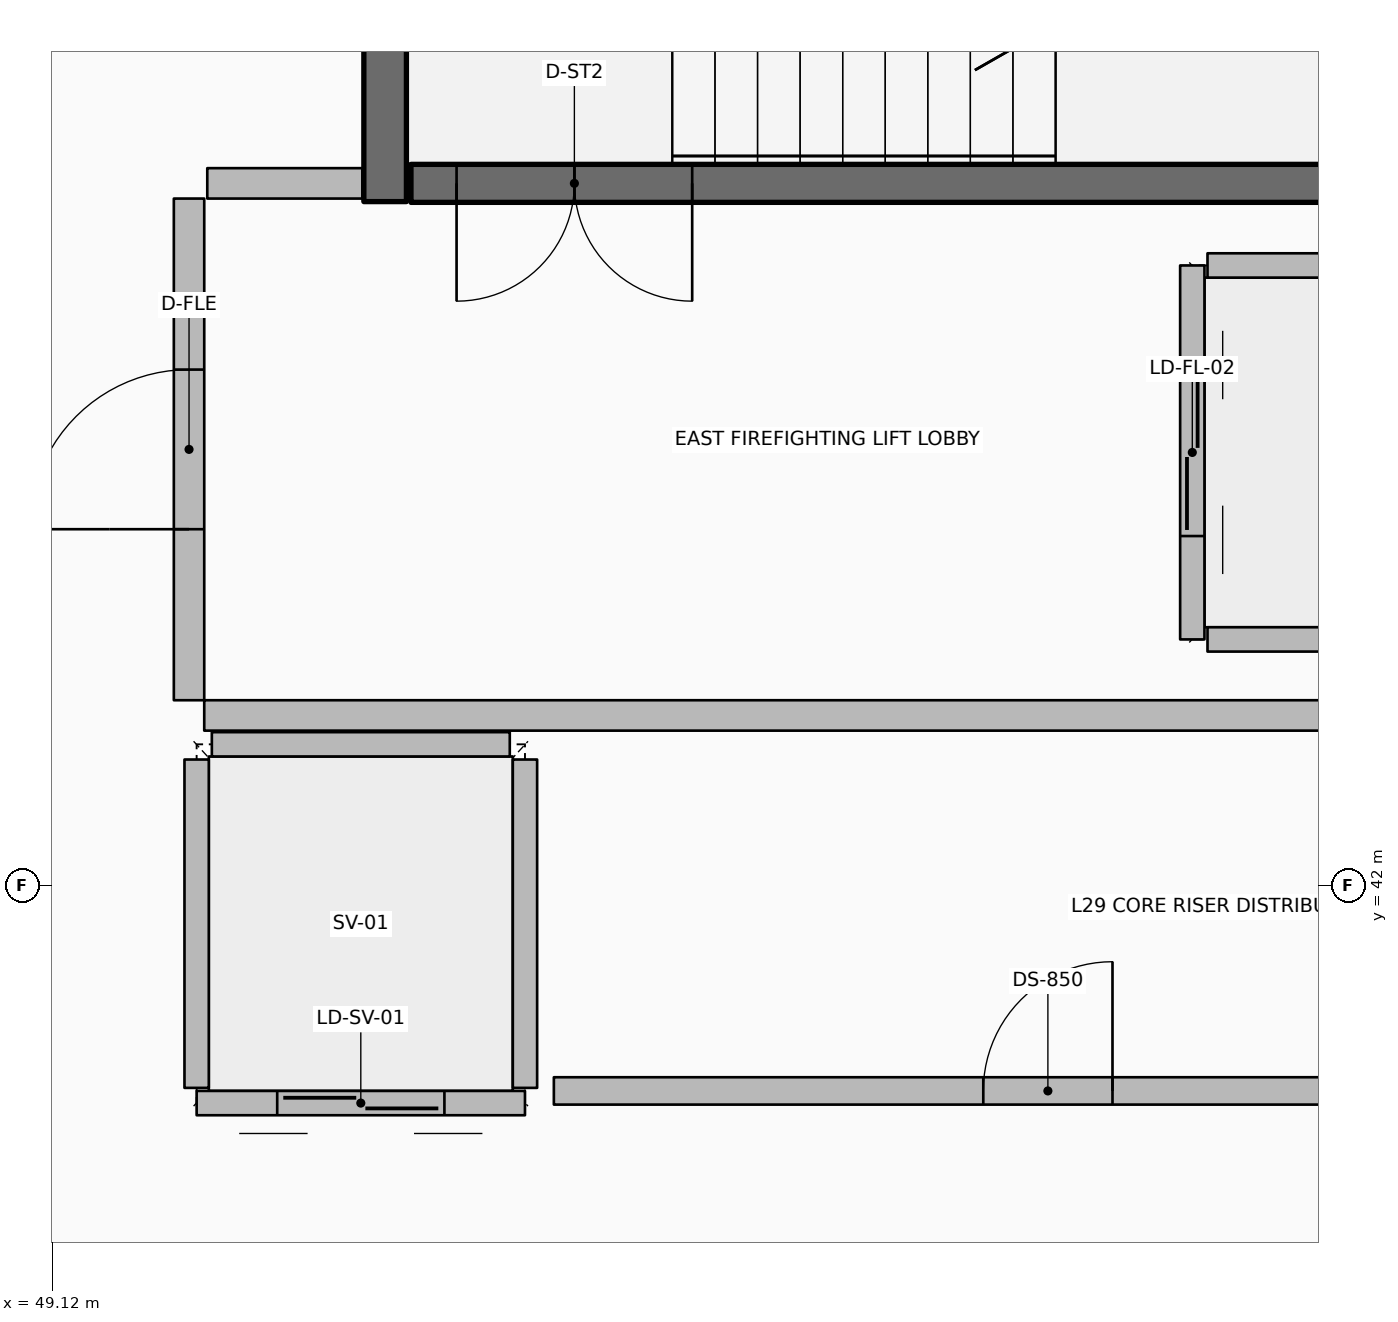
"""IFC4 building model, lengths in metres.
Left out: names, types, materials, properties, quantities, classifications, styles, units other than length and angle.
Written with IfcOpenShell. Run it as: python <this file> out.ifc"""

import sys

from ifc_helpers import new_model, si_unit, direction, frame, frame_2d, origin, origin_2d, place, context, subcontext, project, spatial, rectangle, hollow_rectangle, extrude, element, fill, save


model = new_model("IFC4")
c1 = context("Model", 3, precision=1e-05, world=origin(), true_north=direction((0.0, 1.0)))
c2 = subcontext(c1, "Body", "Model", "MODEL_VIEW")
j1 = project(units=[si_unit("LENGTHUNIT", "METRE"), si_unit("PLANEANGLEUNIT", "RADIAN")], contexts=[c1])
p1 = place(None, origin())
s1 = spatial("IfcSite", under=j1, at=p1, CompositionType="ELEMENT")
p2 = place(p1, origin())
s2 = spatial("IfcBuilding", under=s1, at=p2, CompositionType="ELEMENT")
p3 = place(p2, frame((0.0, 0.0, 116.4)))
s3 = spatial("IfcBuildingStorey", under=s2, at=p3, CompositionType="ELEMENT", Elevation=116.4)
p4 = place(p3, frame((51.31, 46.5, 0.0), z_axis=(0.0, 0.0, 1.0), x_axis=(0.0, 1.0, 0.0)))
e1 = element("IfcWall", 1, at=p4, inside=s3, PredefinedType="SHEAR", context=c2, shape_type="SweptSolid", body=[
    extrude(rectangle(XDim=3.5, YDim=0.28, at=frame_2d((1.75, 0.0))), origin(), (0.0, 0.0, 1.0), 6.6),
])
p5 = place(p3, frame((55.72, 46.62, 0.0), z_axis=(0.0, 0.0, 1.0), x_axis=(1.0, 0.0, 0.0)))
e2 = element("IfcColumn", 2, at=p5, inside=s3, PredefinedType="COLUMN", context=c2, shape_type="SweptSolid", body=[
    extrude(hollow_rectangle(XDim=0.2, YDim=0.2, WallThickness=0.01, InnerFilletRadius=0.01, OuterFilletRadius=0.02, at=origin_2d()), origin(), (0.0, 0.0, 1.0), 1.445),
])
p6 = place(p3, frame((56.42, 46.62, 0.0), z_axis=(0.0, 0.0, 1.0), x_axis=(1.0, 0.0, 0.0)))
e3 = element("IfcColumn", 3, at=p6, inside=s3, PredefinedType="COLUMN", context=c2, shape_type="SweptSolid", body=[
    extrude(hollow_rectangle(XDim=0.2, YDim=0.2, WallThickness=0.01, InnerFilletRadius=0.01, OuterFilletRadius=0.02, at=origin_2d()), origin(), (0.0, 0.0, 1.0), 4.745),
])
p7 = place(p3, frame((51.48, 46.62, 0.0), z_axis=(0.0, 0.0, 1.0), x_axis=(1.0, 0.0, 0.0)))
e4 = element("IfcWall", 4, at=p7, inside=s3, PredefinedType="SOLIDWALL", context=c2, shape_type="SweptSolid", body=[
    extrude(rectangle(XDim=7.54, YDim=0.25, at=frame_2d((3.77, 0.0))), origin(), (0.0, 0.0, 1.0), 6.28),
])
p8 = place(p7, frame((0.3, 0.0, 0.0)))
e5 = element("IfcOpeningElement", 5, at=p8, cuts=e4, PredefinedType="OPENING", context=c2, shape_type="SweptSolid", body=[
    extrude(rectangle(XDim=1.55, YDim=2.15, at=frame_2d((0.775, 1.075))), frame((0.0, 0.135, 0.0), z_axis=(0.0, -1.0, 0.0), x_axis=(1.0, 0.0, 0.0)), (0.0, 0.0, 1.0), 0.27),
])
p9 = place(p3, frame((56.62, 46.08, 0.0), z_axis=(0.0, 0.0, 1.0), x_axis=(0.0, -1.0, 0.0)))
e6 = element("IfcWall", 6, at=p9, inside=s3, PredefinedType="PARTITIONING", context=c2, shape_type="SweptSolid", body=[
    extrude(rectangle(XDim=2.46, YDim=0.16, at=frame_2d((1.23, 0.0))), origin(), (0.0, 0.0, 1.0), 6.28),
])
p10 = place(p9, frame((0.68, 0.0, 0.0)))
e7 = element("IfcOpeningElement", 7, at=p10, cuts=e6, PredefinedType="OPENING", context=c2, shape_type="SweptSolid", body=[
    extrude(rectangle(XDim=1.1, YDim=2.1, at=frame_2d((0.55, 1.05))), frame((0.0, 0.09, 0.0), z_axis=(0.0, -1.0, 0.0), x_axis=(1.0, 0.0, 0.0)), (0.0, 0.0, 1.0), 0.18),
])
for number, where, z_axis, x_axis in (
    (8, (56.72, 46.08, 0.0), (0.0, 0.0, 1.0), (1.0, 0.0, 0.0)),
    (9, (56.72, 43.62, 0.0), (0.0, 0.0, 1.0), (1.0, 0.0, 0.0)),
):
    element("IfcWall", number, at=place(p3, frame(where, z_axis=z_axis, x_axis=x_axis)), inside=s3, PredefinedType="PARTITIONING", context=c2, shape_type="SweptSolid", body=[
        extrude(rectangle(XDim=2.06, YDim=0.16, at=frame_2d((1.03, 0.0))), origin(), (0.0, 0.0, 1.0), 6.28),
    ])
p11 = place(p3, frame((52.23, 40.57, 0.0), z_axis=(0.0, 0.0, 1.0), x_axis=(-1.0, 0.0, 0.0)))
e10 = element("IfcWall", 10, at=p11, inside=s3, PredefinedType="PARTITIONING", context=c2, shape_type="SweptSolid", body=[
    extrude(rectangle(XDim=2.16, YDim=0.16, at=frame_2d((1.08, 0.0))), origin(), (0.0, 0.0, 1.0), 6.28),
])
p12 = place(p11, frame((0.53, 0.0, 0.0)))
e11 = element("IfcOpeningElement", 11, at=p12, cuts=e10, PredefinedType="OPENING", context=c2, shape_type="SweptSolid", body=[
    extrude(rectangle(XDim=1.1, YDim=2.1, at=frame_2d((0.55, 1.05))), frame((0.0, 0.09, 0.0), z_axis=(0.0, -1.0, 0.0), x_axis=(1.0, 0.0, 0.0)), (0.0, 0.0, 1.0), 0.18),
])
for number, where, z_axis, x_axis in (
    (12, (52.23, 40.67, 0.0), (0.0, 0.0, 1.0), (0.0, 1.0, 0.0)),
    (13, (50.07, 40.67, 0.0), (0.0, 0.0, 1.0), (0.0, 1.0, 0.0)),
):
    element("IfcWall", number, at=place(p3, frame(where, z_axis=z_axis, x_axis=x_axis)), inside=s3, PredefinedType="PARTITIONING", context=c2, shape_type="SweptSolid", body=[
        extrude(rectangle(XDim=2.16, YDim=0.16, at=frame_2d((1.08, 0.0))), origin(), (0.0, 0.0, 1.0), 6.28),
    ])
p13 = place(p3, frame((50.17, 42.93, 0.0), z_axis=(0.0, 0.0, 1.0), x_axis=(1.0, 0.0, 0.0)))
e14 = element("IfcWall", 14, at=p13, inside=s3, PredefinedType="PARTITIONING", context=c2, shape_type="SweptSolid", body=[
    extrude(rectangle(XDim=1.96, YDim=0.16, at=frame_2d((0.98, 0.0))), origin(), (0.0, 0.0, 1.0), 6.28),
])
p14 = place(p3, frame((52.42, 40.65, 0.0), z_axis=(0.0, 0.0, 1.0), x_axis=(1.0, 0.0, 0.0)))
e15 = element("IfcWall", 15, at=p14, inside=s3, PredefinedType="PARTITIONING", context=c2, shape_type="SweptSolid", body=[
    extrude(rectangle(XDim=6.5, YDim=0.18, at=frame_2d((3.25, 0.0))), origin(), (0.0, 0.0, 1.0), 6.28),
])
p15 = place(p14, frame((2.825, 0.0, 0.0)))
e16 = element("IfcOpeningElement", 16, at=p15, cuts=e15, PredefinedType="OPENING", context=c2, shape_type="SweptSolid", body=[
    extrude(rectangle(XDim=0.85, YDim=2.06, at=frame_2d((0.425, 1.03))), frame((0.0, 0.1, 0.0), z_axis=(0.0, -1.0, 0.0), x_axis=(1.0, 0.0, 0.0)), (0.0, 0.0, 1.0), 0.2),
])
p16 = place(p3, frame((50.12, 43.12, 0.0), z_axis=(0.0, 0.0, 1.0), x_axis=(1.0, 0.0, 0.0)))
e17 = element("IfcWall", 17, at=p16, inside=s3, PredefinedType="PARTITIONING", context=c2, shape_type="SweptSolid", body=[
    extrude(rectangle(XDim=8.88, YDim=0.2, at=frame_2d((4.44, 0.0))), origin(), (0.0, 0.0, 1.0), 6.28),
])
p17 = place(p3, frame((50.14, 46.62, 0.0), z_axis=(0.0, 0.0, 1.0), x_axis=(1.0, 0.0, 0.0)))
e18 = element("IfcWall", 18, at=p17, inside=s3, PredefinedType="PARTITIONING", context=c2, shape_type="SweptSolid", body=[
    extrude(rectangle(XDim=1.02, YDim=0.2, at=frame_2d((0.51, 0.0))), origin(), (0.0, 0.0, 1.0), 6.28),
])
p18 = place(p3, frame((50.02, 43.22, 0.0), z_axis=(0.0, 0.0, 1.0), x_axis=(0.0, 1.0, 0.0)))
e19 = element("IfcWall", 19, at=p18, inside=s3, PredefinedType="PARTITIONING", context=c2, shape_type="SweptSolid", body=[
    extrude(rectangle(XDim=3.3, YDim=0.2, at=frame_2d((1.65, 0.0))), origin(), (0.0, 0.0, 1.0), 6.28),
])
p19 = place(p18, frame((1.125, 0.0, 0.0)))
e20 = element("IfcOpeningElement", 20, at=p19, cuts=e19, PredefinedType="OPENING", context=c2, shape_type="SweptSolid", body=[
    extrude(rectangle(XDim=1.05, YDim=2.1, at=frame_2d((0.525, 1.05))), frame((0.0, 0.11, 0.0), z_axis=(0.0, -1.0, 0.0), x_axis=(1.0, 0.0, 0.0)), (0.0, 0.0, 1.0), 0.22),
])
p20 = place(p8, origin())
e21 = element("IfcDoor", 21, at=p20, inside=s3, OperationType="DOUBLE_DOOR_SINGLE_SWING", PredefinedType="DOOR", context=c2, shape_type="SweptSolid", body=[
    extrude(rectangle(XDim=1.55, YDim=2.15, at=frame_2d((0.775, 1.075))), frame((0.0, 0.025, 0.0), z_axis=(0.0, -1.0, 0.0), x_axis=(1.0, 0.0, 0.0)), (0.0, 0.0, 1.0), 0.05),
])
fill(e5, e21)
p21 = place(p10, origin())
e22 = element("IfcDoor", 22, at=p21, inside=s3, OperationType="DOUBLE_DOOR_SLIDING", PredefinedType="DOOR", context=c2, shape_type="SweptSolid", body=[
    extrude(rectangle(XDim=1.1, YDim=2.1, at=frame_2d((0.55, 1.05))), frame((0.0, 0.025, 0.0), z_axis=(0.0, -1.0, 0.0), x_axis=(1.0, 0.0, 0.0)), (0.0, 0.0, 1.0), 0.05),
])
fill(e7, e22)
p22 = place(p12, origin())
e23 = element("IfcDoor", 23, at=p22, inside=s3, OperationType="DOUBLE_DOOR_SLIDING", PredefinedType="DOOR", context=c2, shape_type="SweptSolid", body=[
    extrude(rectangle(XDim=1.1, YDim=2.1, at=frame_2d((0.55, 1.05))), frame((0.0, 0.025, 0.0), z_axis=(0.0, -1.0, 0.0), x_axis=(1.0, 0.0, 0.0)), (0.0, 0.0, 1.0), 0.05),
])
fill(e11, e23)
p23 = place(p15, origin())
e24 = element("IfcDoor", 24, at=p23, inside=s3, OperationType="SINGLE_SWING_RIGHT", PredefinedType="DOOR", context=c2, shape_type="SweptSolid", body=[
    extrude(rectangle(XDim=0.85, YDim=2.06, at=frame_2d((0.425, 1.03))), frame((0.0, 0.025, 0.0), z_axis=(0.0, -1.0, 0.0), x_axis=(1.0, 0.0, 0.0)), (0.0, 0.0, 1.0), 0.05),
])
fill(e16, e24)
p24 = place(p19, origin())
e25 = element("IfcDoor", 25, at=p24, inside=s3, OperationType="SINGLE_SWING_LEFT", PredefinedType="DOOR", context=c2, shape_type="SweptSolid", body=[
    extrude(rectangle(XDim=1.05, YDim=2.1, at=frame_2d((0.525, 1.05))), frame((0.0, 0.025, 0.0), z_axis=(0.0, -1.0, 0.0), x_axis=(1.0, 0.0, 0.0)), (0.0, 0.0, 1.0), 0.05),
])
fill(e20, e25)
save(model, sys.argv[1])
